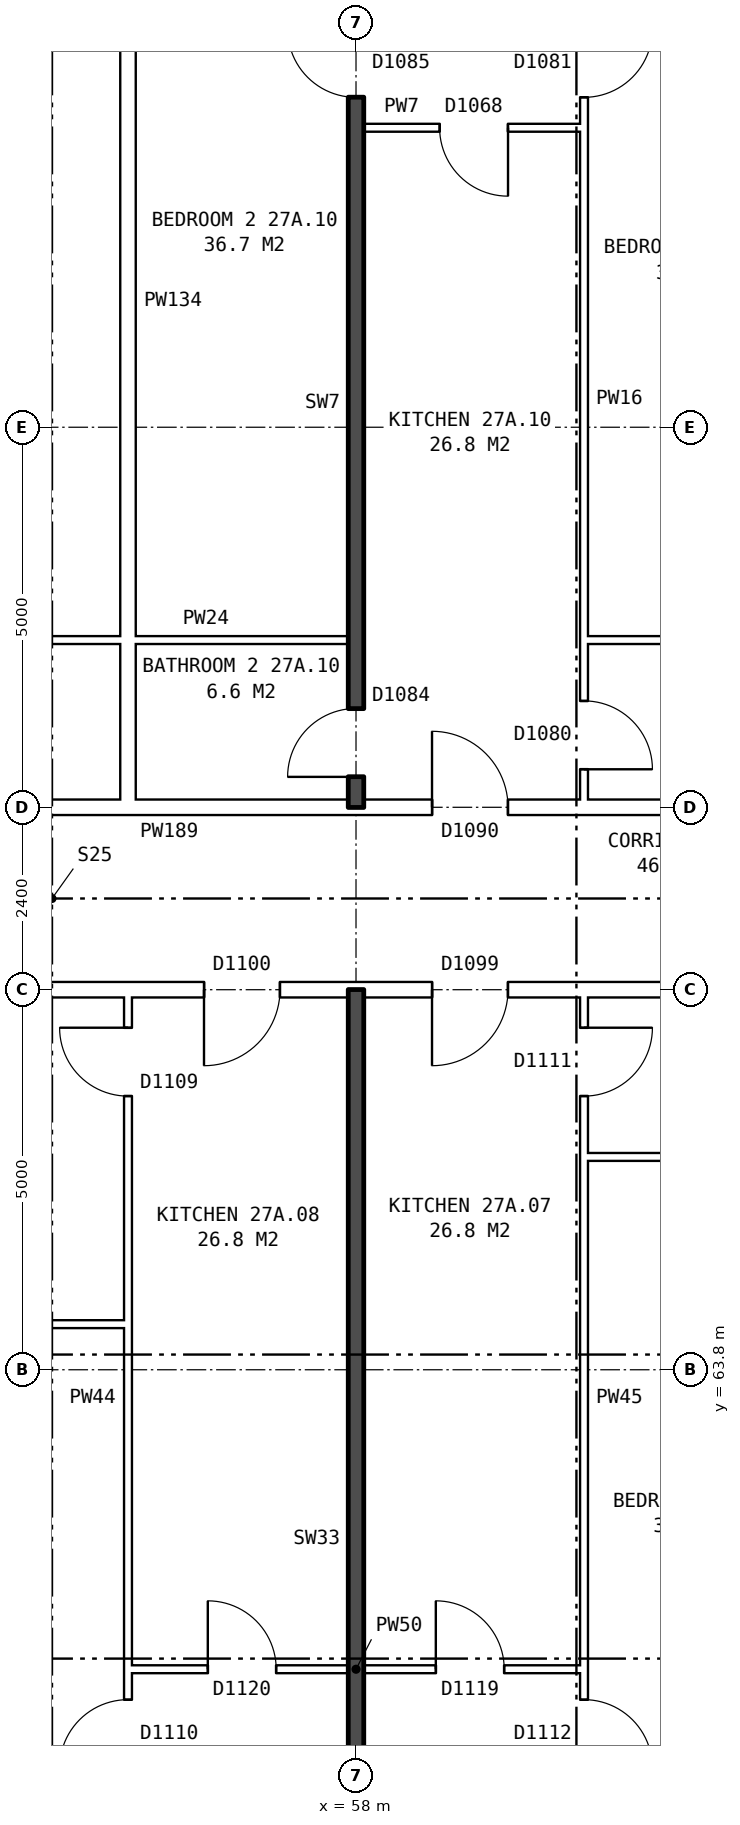
"""IFC4 building model, lengths in metres.
Left out: names, types, materials, properties, quantities, classifications, styles, units other than length and angle.
Written with IfcOpenShell. Run it as: python <this file> out.ifc"""

import sys

from ifc_helpers import new_model, si_unit, direction, frame, frame_2d, origin, place, context, subcontext, project, spatial, rectangle, extrude, element, fill, save


model = new_model("IFC4")
c1 = context("Model", 3, precision=1e-05, world=origin(), true_north=direction((0.0, 1.0)))
c2 = subcontext(c1, "Body", "Model", "MODEL_VIEW")
j1 = project(units=[si_unit("LENGTHUNIT", "METRE"), si_unit("PLANEANGLEUNIT", "RADIAN")], contexts=[c1])
p1 = place(None, origin())
s1 = spatial("IfcSite", under=j1, at=p1, CompositionType="ELEMENT")
p2 = place(p1, origin())
s2 = spatial("IfcBuilding", under=s1, at=p2, CompositionType="ELEMENT")
p3 = place(p2, frame((0.0, 0.0, 99.5)))
s3 = spatial("IfcBuildingStorey", under=s2, at=p3, CompositionType="ELEMENT", Elevation=99.5)
p4 = place(p3, frame((55.0, 59.86, 0.0), z_axis=(0.0, 0.0, 1.0), x_axis=(1.0, 0.0, 0.0)))
e1 = element("IfcWall", 1, at=p4, inside=s3, PredefinedType="PARTITIONING", context=c2, shape_type="SweptSolid", body=[
    extrude(rectangle(XDim=6.0, YDim=0.1, at=frame_2d((3.0, 0.0))), origin(), (0.0, 0.0, 1.0), 2.85),
])
p5 = place(p4, frame((4.05, 0.0, 0.0)))
e2 = element("IfcOpeningElement", 2, at=p5, cuts=e1, PredefinedType="OPENING", context=c2, shape_type="SweptSolid", body=[
    extrude(rectangle(XDim=0.9, YDim=2.1, at=frame_2d((0.45, 1.05))), frame((0.0, 0.06, 0.0), z_axis=(0.0, -1.0, 0.0), x_axis=(1.0, 0.0, 0.0)), (0.0, 0.0, 1.0), 0.12),
])
p6 = place(p4, frame((1.05, 0.0, 0.0)))
e3 = element("IfcOpeningElement", 3, at=p6, cuts=e1, PredefinedType="OPENING", context=c2, shape_type="SweptSolid", body=[
    extrude(rectangle(XDim=0.9, YDim=2.1, at=frame_2d((0.45, 1.05))), frame((0.0, 0.06, 0.0), z_axis=(0.0, -1.0, 0.0), x_axis=(1.0, 0.0, 0.0)), (0.0, 0.0, 1.0), 0.12),
])
p7 = place(p3, frame((52.1, 64.4, 0.0), z_axis=(0.0, 0.0, 1.0), x_axis=(1.0, 0.0, 0.0)))
e4 = element("IfcWall", 4, at=p7, inside=s3, PredefinedType="PARTITIONING", context=c2, shape_type="SweptSolid", body=[
    extrude(rectangle(XDim=2.9, YDim=0.1, at=frame_2d((1.45, 0.0))), origin(), (0.0, 0.0, 1.0), 2.85),
])
p8 = place(p3, frame((61.0, 66.6, 0.0), z_axis=(0.0, 0.0, 1.0), x_axis=(1.0, 0.0, 0.0)))
e5 = element("IfcWall", 5, at=p8, inside=s3, PredefinedType="PARTITIONING", context=c2, shape_type="SweptSolid", body=[
    extrude(rectangle(XDim=2.64, YDim=0.1, at=frame_2d((1.32, 0.0))), origin(), (0.0, 0.0, 1.0), 2.85),
])
p9 = place(p3, frame((44.36, 68.8, 0.0), z_axis=(0.0, 0.0, 1.0), x_axis=(1.0, 0.0, 0.0)))
e6 = element("IfcWall", 6, at=p9, inside=s3, PredefinedType="PARTITIONING", context=c2, shape_type="SweptSolid", body=[
    extrude(rectangle(XDim=19.28, YDim=0.2, at=frame_2d((9.64, 0.0))), origin(), (0.0, 0.0, 1.0), 2.85),
])
p10 = place(p9, frame((14.64, 0.0, 0.0)))
e7 = element("IfcOpeningElement", 7, at=p10, cuts=e6, PredefinedType="OPENING", context=c2, shape_type="SweptSolid", body=[
    extrude(rectangle(XDim=1.0, YDim=2.1, at=frame_2d((0.5, 1.05))), frame((0.0, 0.11, 0.0), z_axis=(0.0, -1.0, 0.0), x_axis=(1.0, 0.0, 0.0)), (0.0, 0.0, 1.0), 0.22),
])
p11 = place(p9, frame((11.64, 0.0, 0.0)))
e8 = element("IfcOpeningElement", 8, at=p11, cuts=e6, PredefinedType="OPENING", context=c2, shape_type="SweptSolid", body=[
    extrude(rectangle(XDim=1.0, YDim=2.1, at=frame_2d((0.5, 1.05))), frame((0.0, 0.11, 0.0), z_axis=(0.0, -1.0, 0.0), x_axis=(1.0, 0.0, 0.0)), (0.0, 0.0, 1.0), 0.22),
])
p12 = place(p9, frame((5.64, 0.0, 0.0)))
e9 = element("IfcOpeningElement", 9, at=p12, cuts=e6, PredefinedType="OPENING", context=c2, shape_type="SweptSolid", body=[
    extrude(rectangle(XDim=1.0, YDim=2.1, at=frame_2d((0.5, 1.05))), frame((0.0, 0.11, 0.0), z_axis=(0.0, -1.0, 0.0), x_axis=(1.0, 0.0, 0.0)), (0.0, 0.0, 1.0), 0.22),
])
p13 = place(p3, frame((44.36, 71.2, 0.0), z_axis=(0.0, 0.0, 1.0), x_axis=(1.0, 0.0, 0.0)))
e10 = element("IfcWall", 10, at=p13, inside=s3, PredefinedType="PARTITIONING", context=c2, shape_type="SweptSolid", body=[
    extrude(rectangle(XDim=19.28, YDim=0.2, at=frame_2d((9.64, 0.0))), origin(), (0.0, 0.0, 1.0), 2.85),
])
p14 = place(p13, frame((14.64, 0.0, 0.0)))
e11 = element("IfcOpeningElement", 11, at=p14, cuts=e10, PredefinedType="OPENING", context=c2, shape_type="SweptSolid", body=[
    extrude(rectangle(XDim=1.0, YDim=2.1, at=frame_2d((0.5, 1.05))), frame((0.0, 0.11, 0.0), z_axis=(0.0, -1.0, 0.0), x_axis=(1.0, 0.0, 0.0)), (0.0, 0.0, 1.0), 0.22),
])
p15 = place(p13, frame((5.64, 0.0, 0.0)))
e12 = element("IfcOpeningElement", 12, at=p15, cuts=e10, PredefinedType="OPENING", context=c2, shape_type="SweptSolid", body=[
    extrude(rectangle(XDim=1.0, YDim=2.1, at=frame_2d((0.5, 1.05))), frame((0.0, 0.11, 0.0), z_axis=(0.0, -1.0, 0.0), x_axis=(1.0, 0.0, 0.0)), (0.0, 0.0, 1.0), 0.22),
])
p16 = place(p3, frame((52.1, 73.4, 0.0), z_axis=(0.0, 0.0, 1.0), x_axis=(1.0, 0.0, 0.0)))
e13 = element("IfcWall", 13, at=p16, inside=s3, PredefinedType="PARTITIONING", context=c2, shape_type="SweptSolid", body=[
    extrude(rectangle(XDim=5.8, YDim=0.1, at=frame_2d((2.9, 0.0))), origin(), (0.0, 0.0, 1.0), 2.85),
])
p17 = place(p3, frame((61.0, 73.4, 0.0), z_axis=(0.0, 0.0, 1.0), x_axis=(1.0, 0.0, 0.0)))
e14 = element("IfcWall", 14, at=p17, inside=s3, PredefinedType="PARTITIONING", context=c2, shape_type="SweptSolid", body=[
    extrude(rectangle(XDim=2.64, YDim=0.1, at=frame_2d((1.32, 0.0))), origin(), (0.0, 0.0, 1.0), 2.85),
])
p18 = place(p3, frame((58.1, 80.14, 0.0), z_axis=(0.0, 0.0, 1.0), x_axis=(1.0, 0.0, 0.0)))
e15 = element("IfcWall", 15, at=p18, inside=s3, PredefinedType="PARTITIONING", context=c2, shape_type="SweptSolid", body=[
    extrude(rectangle(XDim=2.9, YDim=0.1, at=frame_2d((1.45, 0.0))), origin(), (0.0, 0.0, 1.0), 2.85),
])
p19 = place(p18, frame((1.0, 0.0, 0.0)))
e16 = element("IfcOpeningElement", 16, at=p19, cuts=e15, PredefinedType="OPENING", context=c2, shape_type="SweptSolid", body=[
    extrude(rectangle(XDim=0.9, YDim=2.1, at=frame_2d((0.45, 1.05))), frame((0.0, 0.06, 0.0), z_axis=(0.0, -1.0, 0.0), x_axis=(1.0, 0.0, 0.0)), (0.0, 0.0, 1.0), 0.12),
])
p20 = place(p3, frame((55.0, 54.36, 0.0), z_axis=(0.0, 0.0, 1.0), x_axis=(0.0, 1.0, 0.0)))
e17 = element("IfcWall", 17, at=p20, inside=s3, PredefinedType="PARTITIONING", context=c2, shape_type="SweptSolid", body=[
    extrude(rectangle(XDim=14.34, YDim=0.1, at=frame_2d((7.17, 0.0))), origin(), (0.0, 0.0, 1.0), 2.85),
])
p21 = place(p20, frame((4.2, 0.0, 0.0)))
e18 = element("IfcOpeningElement", 18, at=p21, cuts=e17, PredefinedType="OPENING", context=c2, shape_type="SweptSolid", body=[
    extrude(rectangle(XDim=0.9, YDim=2.1, at=frame_2d((0.45, 1.05))), frame((0.0, 0.06, 0.0), z_axis=(0.0, -1.0, 0.0), x_axis=(1.0, 0.0, 0.0)), (0.0, 0.0, 1.0), 0.12),
])
p22 = place(p20, frame((13.04, 0.0, 0.0)))
e19 = element("IfcOpeningElement", 19, at=p22, cuts=e17, PredefinedType="OPENING", context=c2, shape_type="SweptSolid", body=[
    extrude(rectangle(XDim=0.9, YDim=2.1, at=frame_2d((0.45, 1.05))), frame((0.0, 0.06, 0.0), z_axis=(0.0, -1.0, 0.0), x_axis=(1.0, 0.0, 0.0)), (0.0, 0.0, 1.0), 0.12),
])
p23 = place(p3, frame((55.0, 71.3, 0.0), z_axis=(0.0, 0.0, 1.0), x_axis=(0.0, 1.0, 0.0)))
e20 = element("IfcWall", 20, at=p23, inside=s3, PredefinedType="PARTITIONING", context=c2, shape_type="SweptSolid", body=[
    extrude(rectangle(XDim=14.34, YDim=0.2, at=frame_2d((7.17, 0.0))), origin(), (0.0, 0.0, 1.0), 2.85),
])
p24 = place(p3, frame((58.0, 54.36, 0.0), z_axis=(0.0, 0.0, 1.0), x_axis=(0.0, 1.0, 0.0)))
e21 = element("IfcWall", 21, at=p24, inside=s3, PredefinedType="SOLIDWALL", context=c2, shape_type="SweptSolid", body=[
    extrude(rectangle(XDim=14.44, YDim=0.2, at=frame_2d((7.22, 0.0))), origin(), (0.0, 0.0, 1.0), 2.85),
])
p25 = place(p3, frame((58.0, 71.2, 0.0), z_axis=(0.0, 0.0, 1.0), x_axis=(0.0, 1.0, 0.0)))
e22 = element("IfcWall", 22, at=p25, inside=s3, PredefinedType="SOLIDWALL", context=c2, shape_type="SweptSolid", body=[
    extrude(rectangle(XDim=14.44, YDim=0.2, at=frame_2d((7.22, 0.0))), origin(), (0.0, 0.0, 1.0), 2.85),
])
p26 = place(p25, frame((9.34, 0.0, 0.0)))
e23 = element("IfcOpeningElement", 23, at=p26, cuts=e22, PredefinedType="OPENING", context=c2, shape_type="SweptSolid", body=[
    extrude(rectangle(XDim=0.9, YDim=2.1, at=frame_2d((0.45, 1.05))), frame((0.0, 0.11, 0.0), z_axis=(0.0, -1.0, 0.0), x_axis=(1.0, 0.0, 0.0)), (0.0, 0.0, 1.0), 0.22),
])
p27 = place(p25, frame((0.4, 0.0, 0.0)))
e24 = element("IfcOpeningElement", 24, at=p27, cuts=e22, PredefinedType="OPENING", context=c2, shape_type="SweptSolid", body=[
    extrude(rectangle(XDim=0.9, YDim=2.1, at=frame_2d((0.45, 1.05))), frame((0.0, 0.11, 0.0), z_axis=(0.0, -1.0, 0.0), x_axis=(1.0, 0.0, 0.0)), (0.0, 0.0, 1.0), 0.22),
])
p28 = place(p3, frame((61.0, 54.36, 0.0), z_axis=(0.0, 0.0, 1.0), x_axis=(0.0, 1.0, 0.0)))
e25 = element("IfcWall", 25, at=p28, inside=s3, PredefinedType="PARTITIONING", context=c2, shape_type="SweptSolid", body=[
    extrude(rectangle(XDim=14.34, YDim=0.1, at=frame_2d((7.17, 0.0))), origin(), (0.0, 0.0, 1.0), 2.85),
])
p29 = place(p28, frame((4.2, 0.0, 0.0)))
e26 = element("IfcOpeningElement", 26, at=p29, cuts=e25, PredefinedType="OPENING", context=c2, shape_type="SweptSolid", body=[
    extrude(rectangle(XDim=0.9, YDim=2.1, at=frame_2d((0.45, 1.05))), frame((0.0, 0.06, 0.0), z_axis=(0.0, -1.0, 0.0), x_axis=(1.0, 0.0, 0.0)), (0.0, 0.0, 1.0), 0.12),
])
p30 = place(p28, frame((13.04, 0.0, 0.0)))
e27 = element("IfcOpeningElement", 27, at=p30, cuts=e25, PredefinedType="OPENING", context=c2, shape_type="SweptSolid", body=[
    extrude(rectangle(XDim=0.9, YDim=2.1, at=frame_2d((0.45, 1.05))), frame((0.0, 0.06, 0.0), z_axis=(0.0, -1.0, 0.0), x_axis=(1.0, 0.0, 0.0)), (0.0, 0.0, 1.0), 0.12),
])
p31 = place(p3, frame((61.0, 71.3, 0.0), z_axis=(0.0, 0.0, 1.0), x_axis=(0.0, 1.0, 0.0)))
e28 = element("IfcWall", 28, at=p31, inside=s3, PredefinedType="PARTITIONING", context=c2, shape_type="SweptSolid", body=[
    extrude(rectangle(XDim=14.34, YDim=0.1, at=frame_2d((7.17, 0.0))), origin(), (0.0, 0.0, 1.0), 2.85),
])
p32 = place(p31, frame((9.24, 0.0, 0.0)))
e29 = element("IfcOpeningElement", 29, at=p32, cuts=e28, PredefinedType="OPENING", context=c2, shape_type="SweptSolid", body=[
    extrude(rectangle(XDim=0.9, YDim=2.1, at=frame_2d((0.45, 1.05))), frame((0.0, 0.06, 0.0), z_axis=(0.0, -1.0, 0.0), x_axis=(1.0, 0.0, 0.0)), (0.0, 0.0, 1.0), 0.12),
])
p33 = place(p31, frame((0.4, 0.0, 0.0)))
e30 = element("IfcOpeningElement", 30, at=p33, cuts=e28, PredefinedType="OPENING", context=c2, shape_type="SweptSolid", body=[
    extrude(rectangle(XDim=0.9, YDim=2.1, at=frame_2d((0.45, 1.05))), frame((0.0, 0.06, 0.0), z_axis=(0.0, -1.0, 0.0), x_axis=(1.0, 0.0, 0.0)), (0.0, 0.0, 1.0), 0.12),
])
p34 = place(p29, frame((0.9, 0.0, 0.0), z_axis=(0.0, 0.0, 1.0), x_axis=(-1.0, 0.0, 0.0)))
e31 = element("IfcDoor", 31, at=p34, inside=s3, OperationType="SINGLE_SWING_RIGHT", PredefinedType="DOOR", context=c2, shape_type="SweptSolid", body=[
    extrude(rectangle(XDim=0.9, YDim=2.1, at=frame_2d((0.45, 1.05))), frame((0.0, 0.025, 0.0), z_axis=(0.0, -1.0, 0.0), x_axis=(1.0, 0.0, 0.0)), (0.0, 0.0, 1.0), 0.05),
])
fill(e26, e31)
p35 = place(p10, frame((1.0, 0.0, 0.0), z_axis=(0.0, 0.0, 1.0), x_axis=(-1.0, 0.0, 0.0)))
e32 = element("IfcDoor", 32, at=p35, inside=s3, OperationType="SINGLE_SWING_RIGHT", PredefinedType="DOOR", context=c2, shape_type="SweptSolid", body=[
    extrude(rectangle(XDim=1.0, YDim=2.1, at=frame_2d((0.5, 1.05))), frame((0.0, 0.025, 0.0), z_axis=(0.0, -1.0, 0.0), x_axis=(1.0, 0.0, 0.0)), (0.0, 0.0, 1.0), 0.05),
])
fill(e7, e32)
p36 = place(p5, origin())
e33 = element("IfcDoor", 33, at=p36, inside=s3, OperationType="SINGLE_SWING_LEFT", PredefinedType="DOOR", context=c2, shape_type="SweptSolid", body=[
    extrude(rectangle(XDim=0.9, YDim=2.1, at=frame_2d((0.45, 1.05))), frame((0.0, 0.025, 0.0), z_axis=(0.0, -1.0, 0.0), x_axis=(1.0, 0.0, 0.0)), (0.0, 0.0, 1.0), 0.05),
])
fill(e2, e33)
p37 = place(p30, frame((0.9, 0.0, 0.0), z_axis=(0.0, 0.0, 1.0), x_axis=(-1.0, 0.0, 0.0)))
e34 = element("IfcDoor", 34, at=p37, inside=s3, OperationType="SINGLE_SWING_LEFT", PredefinedType="DOOR", context=c2, shape_type="SweptSolid", body=[
    extrude(rectangle(XDim=0.9, YDim=2.1, at=frame_2d((0.45, 1.05))), frame((0.0, 0.025, 0.0), z_axis=(0.0, -1.0, 0.0), x_axis=(1.0, 0.0, 0.0)), (0.0, 0.0, 1.0), 0.05),
])
fill(e27, e34)
p38 = place(p21, origin())
e35 = element("IfcDoor", 35, at=p38, inside=s3, OperationType="SINGLE_SWING_LEFT", PredefinedType="DOOR", context=c2, shape_type="SweptSolid", body=[
    extrude(rectangle(XDim=0.9, YDim=2.1, at=frame_2d((0.45, 1.05))), frame((0.0, 0.025, 0.0), z_axis=(0.0, -1.0, 0.0), x_axis=(1.0, 0.0, 0.0)), (0.0, 0.0, 1.0), 0.05),
])
fill(e18, e35)
p39 = place(p11, frame((1.0, 0.0, 0.0), z_axis=(0.0, 0.0, 1.0), x_axis=(-1.0, 0.0, 0.0)))
e36 = element("IfcDoor", 36, at=p39, inside=s3, OperationType="SINGLE_SWING_RIGHT", PredefinedType="DOOR", context=c2, shape_type="SweptSolid", body=[
    extrude(rectangle(XDim=1.0, YDim=2.1, at=frame_2d((0.5, 1.05))), frame((0.0, 0.025, 0.0), z_axis=(0.0, -1.0, 0.0), x_axis=(1.0, 0.0, 0.0)), (0.0, 0.0, 1.0), 0.05),
])
fill(e8, e36)
p40 = place(p6, origin())
e37 = element("IfcDoor", 37, at=p40, inside=s3, OperationType="SINGLE_SWING_LEFT", PredefinedType="DOOR", context=c2, shape_type="SweptSolid", body=[
    extrude(rectangle(XDim=0.9, YDim=2.1, at=frame_2d((0.45, 1.05))), frame((0.0, 0.025, 0.0), z_axis=(0.0, -1.0, 0.0), x_axis=(1.0, 0.0, 0.0)), (0.0, 0.0, 1.0), 0.05),
])
fill(e3, e37)
p41 = place(p22, origin())
e38 = element("IfcDoor", 38, at=p41, inside=s3, OperationType="SINGLE_SWING_RIGHT", PredefinedType="DOOR", context=c2, shape_type="SweptSolid", body=[
    extrude(rectangle(XDim=0.9, YDim=2.1, at=frame_2d((0.45, 1.05))), frame((0.0, 0.025, 0.0), z_axis=(0.0, -1.0, 0.0), x_axis=(1.0, 0.0, 0.0)), (0.0, 0.0, 1.0), 0.05),
])
fill(e19, e38)
p42 = place(p32, frame((0.9, 0.0, 0.0), z_axis=(0.0, 0.0, 1.0), x_axis=(-1.0, 0.0, 0.0)))
e39 = element("IfcDoor", 39, at=p42, inside=s3, OperationType="SINGLE_SWING_LEFT", PredefinedType="DOOR", context=c2, shape_type="SweptSolid", body=[
    extrude(rectangle(XDim=0.9, YDim=2.1, at=frame_2d((0.45, 1.05))), frame((0.0, 0.025, 0.0), z_axis=(0.0, -1.0, 0.0), x_axis=(1.0, 0.0, 0.0)), (0.0, 0.0, 1.0), 0.05),
])
fill(e29, e39)
p43 = place(p26, origin())
e40 = element("IfcDoor", 40, at=p43, inside=s3, OperationType="SINGLE_SWING_RIGHT", PredefinedType="DOOR", context=c2, shape_type="SweptSolid", body=[
    extrude(rectangle(XDim=0.9, YDim=2.1, at=frame_2d((0.45, 1.05))), frame((0.0, 0.025, 0.0), z_axis=(0.0, -1.0, 0.0), x_axis=(1.0, 0.0, 0.0)), (0.0, 0.0, 1.0), 0.05),
])
fill(e23, e40)
p44 = place(p14, origin())
e41 = element("IfcDoor", 41, at=p44, inside=s3, OperationType="SINGLE_SWING_LEFT", PredefinedType="DOOR", context=c2, shape_type="SweptSolid", body=[
    extrude(rectangle(XDim=1.0, YDim=2.1, at=frame_2d((0.5, 1.05))), frame((0.0, 0.025, 0.0), z_axis=(0.0, -1.0, 0.0), x_axis=(1.0, 0.0, 0.0)), (0.0, 0.0, 1.0), 0.05),
])
fill(e11, e41)
p45 = place(p19, frame((0.9, 0.0, 0.0), z_axis=(0.0, 0.0, 1.0), x_axis=(-1.0, 0.0, 0.0)))
e42 = element("IfcDoor", 42, at=p45, inside=s3, OperationType="SINGLE_SWING_LEFT", PredefinedType="DOOR", context=c2, shape_type="SweptSolid", body=[
    extrude(rectangle(XDim=0.9, YDim=2.1, at=frame_2d((0.45, 1.05))), frame((0.0, 0.025, 0.0), z_axis=(0.0, -1.0, 0.0), x_axis=(1.0, 0.0, 0.0)), (0.0, 0.0, 1.0), 0.05),
])
fill(e16, e42)
p46 = place(p33, frame((0.9, 0.0, 0.0), z_axis=(0.0, 0.0, 1.0), x_axis=(-1.0, 0.0, 0.0)))
e43 = element("IfcDoor", 43, at=p46, inside=s3, OperationType="SINGLE_SWING_RIGHT", PredefinedType="DOOR", context=c2, shape_type="SweptSolid", body=[
    extrude(rectangle(XDim=0.9, YDim=2.1, at=frame_2d((0.45, 1.05))), frame((0.0, 0.025, 0.0), z_axis=(0.0, -1.0, 0.0), x_axis=(1.0, 0.0, 0.0)), (0.0, 0.0, 1.0), 0.05),
])
fill(e30, e43)
p47 = place(p27, origin())
e44 = element("IfcDoor", 44, at=p47, inside=s3, OperationType="SINGLE_SWING_LEFT", PredefinedType="DOOR", context=c2, shape_type="SweptSolid", body=[
    extrude(rectangle(XDim=0.9, YDim=2.1, at=frame_2d((0.45, 1.05))), frame((0.0, 0.025, 0.0), z_axis=(0.0, -1.0, 0.0), x_axis=(1.0, 0.0, 0.0)), (0.0, 0.0, 1.0), 0.05),
])
fill(e24, e44)
save(model, sys.argv[1])
